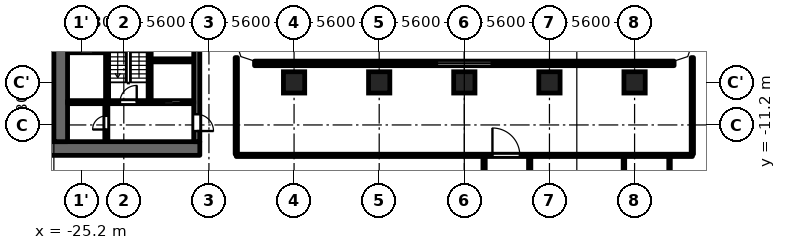
"""IFC4 building model, lengths in metres.
Left out: names, types, materials, properties, quantities, classifications, styles, units other than length and angle.
Written with IfcOpenShell. Run it as: python <this file> out.ifc"""

import sys

from ifc_helpers import new_model, si_unit, direction, frame, frame_2d, origin, origin_2d, place, context, subcontext, project, spatial, polyline, rectangle, outline, extrude, element, fill, save


model = new_model("IFC4")
c1 = context("Model", 3, precision=1e-05, world=origin(), true_north=direction((0.0, 1.0)))
c2 = subcontext(c1, "Body", "Model", "MODEL_VIEW")
j1 = project(units=[si_unit("LENGTHUNIT", "METRE"), si_unit("PLANEANGLEUNIT", "RADIAN")], contexts=[c1])
p1 = place(None, origin())
s1 = spatial("IfcSite", under=j1, at=p1, CompositionType="ELEMENT")
p2 = place(p1, origin())
s2 = spatial("IfcBuilding", under=s1, at=p2, CompositionType="ELEMENT")
p3 = place(p2, frame((0.0, 0.0, 11.3)))
s3 = spatial("IfcBuildingStorey", under=s2, at=p3, CompositionType="ELEMENT", Elevation=11.3)
for number, where, z_axis, x_axis in (
    (1, (-11.2, -8.4, 0.0), (0.0, 0.0, 1.0), (1.0, 0.0, 0.0)),
    (2, (-5.6, -8.4, 0.0), (0.0, 0.0, 1.0), (1.0, 0.0, 0.0)),
    (3, (0.0, -8.4, 0.0), (0.0, 0.0, 1.0), (1.0, 0.0, 0.0)),
    (4, (5.6, -8.4, 0.0), (0.0, 0.0, 1.0), (1.0, 0.0, 0.0)),
    (5, (11.2, -8.4, 0.0), (0.0, 0.0, 1.0), (1.0, 0.0, 0.0)),
):
    element("IfcColumn", number, at=place(p3, frame(where, z_axis=z_axis, x_axis=x_axis)), inside=s3, PredefinedType="COLUMN", context=c2, shape_type="SweptSolid", body=[
        extrude(rectangle(XDim=1.4, YDim=1.4, at=origin_2d()), origin(), (0.0, 0.0, 1.0), 4.8),
    ])
p4 = place(p3, frame((13.8, -7.15, 0.0), z_axis=(0.0, 0.0, 1.0), x_axis=(-1.0, 0.0, 0.0)))
e6 = element("IfcWall", 6, at=p4, inside=s3, PredefinedType="SOLIDWALL", context=c2, shape_type="SweptSolid", body=[
    extrude(rectangle(XDim=27.6, YDim=0.3, at=frame_2d((13.8, 0.0))), origin(), (0.0, 0.0, 1.0), 4.45),
])
p5 = place(p4, frame((12.0, 0.0, 1.2)))
e7 = element("IfcOpeningElement", 7, at=p5, cuts=e6, PredefinedType="OPENING", context=c2, shape_type="SweptSolid", body=[
    extrude(rectangle(XDim=3.6, YDim=0.95, at=frame_2d((1.8, 0.475))), frame((0.0, 0.16, 0.0), z_axis=(0.0, -1.0, 0.0), x_axis=(1.0, 0.0, 0.0)), (0.0, 0.0, 1.0), 0.32),
])
p6 = place(p3, frame((-20.7, -9.6, 0.0), z_axis=(0.0, 0.0, 1.0), x_axis=(0.0, 1.0, 0.0)))
e8 = element("IfcWall", 8, at=p6, inside=s3, PredefinedType="SHEAR", context=c2, shape_type="SweptSolid", body=[
    extrude(rectangle(XDim=9.75, YDim=0.2, at=frame_2d((4.875, 0.0))), origin(), (0.0, 0.0, 1.0), 4.45),
])
p7 = place(p3, frame((-17.4, -12.75, 0.0), z_axis=(0.0, 0.0, 1.0), x_axis=(-1.0, 0.0, 0.0)))
e9 = element("IfcWall", 9, at=p7, inside=s3, PredefinedType="SHEAR", context=c2, shape_type="SweptSolid", body=[
    extrude(rectangle(XDim=10.4, YDim=0.9, at=frame_2d((5.2, 0.0))), origin(), (0.0, 0.0, 1.0), 4.45),
])
p8 = place(p3, frame((-17.6, -12.3, 0.0), z_axis=(0.0, 0.0, 1.0), x_axis=(0.0, 1.0, 0.0)))
e10 = element("IfcWall", 10, at=p8, inside=s3, PredefinedType="SHEAR", context=c2, shape_type="SweptSolid", body=[
    extrude(rectangle(XDim=24.6, YDim=0.4, at=frame_2d((12.3, 0.0))), origin(), (0.0, 0.0, 1.0), 4.45),
])
p9 = place(p8, frame((6.0, 0.0, 0.0)))
e11 = element("IfcOpeningElement", 11, at=p9, cuts=e10, PredefinedType="OPENING", context=c2, shape_type="SweptSolid", body=[
    extrude(rectangle(XDim=1.1, YDim=2.1, at=frame_2d((0.55, 1.05))), frame((0.0, 0.21, 0.0), z_axis=(0.0, -1.0, 0.0), x_axis=(1.0, 0.0, 0.0)), (0.0, 0.0, 1.0), 0.42),
])
p10 = place(p8, frame((8.4, 0.0, 0.0)))
e12 = element("IfcOpeningElement", 12, at=p10, cuts=e10, PredefinedType="OPENING", context=c2, shape_type="SweptSolid", body=[
    extrude(rectangle(XDim=1.1, YDim=2.1, at=frame_2d((0.55, 1.05))), frame((0.0, 0.21, 0.0), z_axis=(0.0, -1.0, 0.0), x_axis=(1.0, 0.0, 0.0)), (0.0, 0.0, 1.0), 0.42),
])
p11 = place(p8, frame((10.8, 0.0, 0.0)))
e13 = element("IfcOpeningElement", 13, at=p11, cuts=e10, PredefinedType="OPENING", context=c2, shape_type="SweptSolid", body=[
    extrude(rectangle(XDim=1.1, YDim=2.1, at=frame_2d((0.55, 1.05))), frame((0.0, 0.21, 0.0), z_axis=(0.0, -1.0, 0.0), x_axis=(1.0, 0.0, 0.0)), (0.0, 0.0, 1.0), 0.42),
])
p12 = place(p8, frame((16.75, 0.0, 0.0)))
e14 = element("IfcOpeningElement", 14, at=p12, cuts=e10, PredefinedType="OPENING", context=c2, shape_type="SweptSolid", body=[
    extrude(rectangle(XDim=0.9, YDim=2.1, at=frame_2d((0.45, 1.05))), frame((0.0, 0.21, 0.0), z_axis=(0.0, -1.0, 0.0), x_axis=(1.0, 0.0, 0.0)), (0.0, 0.0, 1.0), 0.42),
])
p13 = place(p8, frame((22.8, 0.0, 0.0)))
e15 = element("IfcOpeningElement", 15, at=p13, cuts=e10, PredefinedType="OPENING", context=c2, shape_type="SweptSolid", body=[
    extrude(rectangle(XDim=1.1, YDim=2.1, at=frame_2d((0.55, 1.05))), frame((0.0, 0.21, 0.0), z_axis=(0.0, -1.0, 0.0), x_axis=(1.0, 0.0, 0.0)), (0.0, 0.0, 1.0), 0.42),
])
p14 = place(p8, frame((0.7, 0.0, 0.0)))
e16 = element("IfcOpeningElement", 16, at=p14, cuts=e10, PredefinedType="OPENING", context=c2, shape_type="SweptSolid", body=[
    extrude(rectangle(XDim=1.1, YDim=2.1, at=frame_2d((0.55, 1.05))), frame((0.0, 0.21, 0.0), z_axis=(0.0, -1.0, 0.0), x_axis=(1.0, 0.0, 0.0)), (0.0, 0.0, 1.0), 0.42),
])
p15 = place(p8, frame((12.775, 0.0, 0.0)))
e17 = element("IfcOpeningElement", 17, at=p15, cuts=e10, PredefinedType="OPENING", context=c2, shape_type="SweptSolid", body=[
    extrude(rectangle(XDim=1.8, YDim=2.1, at=frame_2d((0.9, 1.05))), frame((0.0, 0.21, 0.0), z_axis=(0.0, -1.0, 0.0), x_axis=(1.0, 0.0, 0.0)), (0.0, 0.0, 1.0), 0.42),
])
p16 = place(p3, frame((-26.55, -12.3, 0.0), z_axis=(0.0, 0.0, 1.0), x_axis=(0.0, 1.0, 0.0)))
e18 = element("IfcWall", 18, at=p16, inside=s3, PredefinedType="SHEAR", context=c2, shape_type="SweptSolid", body=[
    extrude(rectangle(XDim=24.6, YDim=0.9, at=frame_2d((12.3, 0.0))), origin(), (0.0, 0.0, 1.0), 4.45),
])
p17 = place(p3, frame((-23.55, -12.3, 0.0), z_axis=(0.0, 0.0, 1.0), x_axis=(0.0, 1.0, 0.0)))
e19 = element("IfcWall", 19, at=p17, inside=s3, PredefinedType="PARTITIONING", context=c2, shape_type="SweptSolid", body=[
    extrude(rectangle(XDim=2.5, YDim=0.2, at=frame_2d((1.25, 0.0))), origin(), (0.0, 0.0, 1.0), 4.45),
])
p18 = place(p17, frame((0.8, 0.0, 0.0)))
e20 = element("IfcOpeningElement", 20, at=p18, cuts=e19, PredefinedType="OPENING", context=c2, shape_type="SweptSolid", body=[
    extrude(rectangle(XDim=0.9, YDim=2.1, at=frame_2d((0.45, 1.05))), frame((0.0, 0.11, 0.0), z_axis=(0.0, -1.0, 0.0), x_axis=(1.0, 0.0, 0.0)), (0.0, 0.0, 1.0), 0.22),
])
p19 = place(p3, frame((-23.6, -6.35, 0.0), z_axis=(0.0, 0.0, 1.0), x_axis=(-1.0, 0.0, 0.0)))
e21 = element("IfcWall", 21, at=p19, inside=s3, PredefinedType="PARTITIONING", context=c2, shape_type="SweptSolid", body=[
    extrude(rectangle(XDim=2.5, YDim=0.2, at=frame_2d((1.25, 0.0))), origin(), (0.0, 0.0, 1.0), 4.45),
])
p20 = place(p19, frame((0.8, 0.0, 0.0)))
e22 = element("IfcOpeningElement", 22, at=p20, cuts=e21, PredefinedType="OPENING", context=c2, shape_type="SweptSolid", body=[
    extrude(rectangle(XDim=0.9, YDim=2.1, at=frame_2d((0.45, 1.05))), frame((0.0, 0.11, 0.0), z_axis=(0.0, -1.0, 0.0), x_axis=(1.0, 0.0, 0.0)), (0.0, 0.0, 1.0), 0.22),
])
p21 = place(p3, frame((-17.8, -9.7, 0.0), z_axis=(0.0, 0.0, 1.0), x_axis=(-1.0, 0.0, 0.0)))
e23 = element("IfcWall", 23, at=p21, inside=s3, PredefinedType="SHEAR", context=c2, shape_type="SweptSolid", body=[
    extrude(rectangle(XDim=8.3, YDim=0.2, at=frame_2d((4.15, 0.0))), origin(), (0.0, 0.0, 1.0), 4.45),
])
p22 = place(p21, frame((0.85, 0.0, 0.0)))
e24 = element("IfcOpeningElement", 24, at=p22, cuts=e23, PredefinedType="OPENING", context=c2, shape_type="SweptSolid", body=[
    extrude(rectangle(XDim=1.1, YDim=2.1, at=frame_2d((0.55, 1.05))), frame((0.0, 0.11, 0.0), z_axis=(0.0, -1.0, 0.0), x_axis=(1.0, 0.0, 0.0)), (0.0, 0.0, 1.0), 0.22),
])
p23 = place(p21, frame((3.75, 0.0, 0.0)))
e25 = element("IfcOpeningElement", 25, at=p23, cuts=e23, PredefinedType="OPENING", context=c2, shape_type="SweptSolid", body=[
    extrude(rectangle(XDim=1.1, YDim=2.1, at=frame_2d((0.55, 1.05))), frame((0.0, 0.11, 0.0), z_axis=(0.0, -1.0, 0.0), x_axis=(1.0, 0.0, 0.0)), (0.0, 0.0, 1.0), 0.22),
])
p24 = place(p3, frame((-17.8, -6.95, 0.0), z_axis=(0.0, 0.0, 1.0), x_axis=(-1.0, 0.0, 0.0)))
e26 = element("IfcWall", 26, at=p24, inside=s3, PredefinedType="PARTITIONING", context=c2, shape_type="SweptSolid", body=[
    extrude(rectangle(XDim=2.8, YDim=0.2, at=frame_2d((1.4, 0.0))), origin(), (0.0, 0.0, 1.0), 4.45),
])
p25 = place(p3, frame((-23.5, -9.6, 0.0), z_axis=(0.0, 0.0, 1.0), x_axis=(0.0, 1.0, 0.0)))
e27 = element("IfcWall", 27, at=p25, inside=s3, PredefinedType="SHEAR", context=c2, shape_type="SweptSolid", body=[
    extrude(rectangle(XDim=6.9, YDim=0.2, at=frame_2d((3.45, 0.0))), origin(), (0.0, 0.0, 1.0), 4.45),
])
p26 = place(p3, frame((-15.005, -13.2, 0.0), z_axis=(0.0, 0.0, 1.0), x_axis=(1.0, 0.0, 0.0)))
e28 = element("IfcWall", 28, at=p26, inside=s3, PredefinedType="PARTITIONING", context=c2, shape_type="SweptSolid", body=[
    extrude(rectangle(XDim=30.01, YDim=0.15, at=frame_2d((15.005, 0.0))), origin(), (0.0, 0.0, 1.0), 4.45),
])
p27 = place(p26, frame((16.855, 0.0, 0.0)))
e29 = element("IfcOpeningElement", 29, at=p27, cuts=e28, PredefinedType="OPENING", context=c2, shape_type="SweptSolid", body=[
    extrude(rectangle(XDim=1.8, YDim=2.1, at=frame_2d((0.9, 1.05))), frame((0.0, 0.085, 0.0), z_axis=(0.0, -1.0, 0.0), x_axis=(1.0, 0.0, 0.0)), (0.0, 0.0, 1.0), 0.17),
])
p28 = place(p3, frame((-15.0, -13.125, 0.0), z_axis=(0.0, 0.0, 1.0), x_axis=(0.0, 1.0, 0.0)))
e30 = element("IfcWall", 30, at=p28, inside=s3, PredefinedType="PARTITIONING", context=c2, shape_type="SweptSolid", body=[
    extrude(rectangle(XDim=6.356, YDim=0.15, at=frame_2d((3.178, 0.0))), origin(), (0.0, 0.0, 1.0), 4.45),
])
for number, where, z_axis, x_axis in (
    (31, (1.3, -22.325, 0.0), (0.0, 0.0, 1.0), (0.0, 1.0, 0.0)),
    (32, (4.3, -22.325, 0.0), (0.0, 0.0, 1.0), (0.0, 1.0, 0.0)),
):
    element("IfcWall", number, at=place(p3, frame(where, z_axis=z_axis, x_axis=x_axis)), inside=s3, PredefinedType="PARTITIONING", context=c2, shape_type="SweptSolid", body=[
        extrude(rectangle(XDim=9.05, YDim=0.15, at=frame_2d((4.525, 0.0))), origin(), (0.0, 0.0, 1.0), 4.45),
    ])
for number, where, z_axis, x_axis in (
    (33, (10.5, -22.325, 0.0), (0.0, 0.0, 1.0), (0.0, 1.0, 0.0)),
    (34, (13.5, -22.325, 0.0), (0.0, 0.0, 1.0), (0.0, 1.0, 0.0)),
):
    element("IfcWall", number, at=place(p3, frame(where, z_axis=z_axis, x_axis=x_axis)), inside=s3, PredefinedType="PARTITIONING", context=c2, shape_type="SweptSolid", body=[
        extrude(rectangle(XDim=9.05, YDim=0.1, at=frame_2d((4.525, 0.0))), origin(), (0.0, 0.0, 1.0), 4.45),
    ])
p29 = place(p3, frame((15.0, -13.125, 0.0), z_axis=(0.0, 0.0, 1.0), x_axis=(0.0, 1.0, 0.0)))
e35 = element("IfcWall", 35, at=p29, inside=s3, PredefinedType="PARTITIONING", context=c2, shape_type="SweptSolid", body=[
    extrude(rectangle(XDim=6.356, YDim=0.15, at=frame_2d((3.178, 0.0))), origin(), (0.0, 0.0, 1.0), 4.45),
])
p30 = place(p3, origin())
e36 = element("IfcWall", 36, at=p30, inside=s3, PredefinedType="SOLIDWALL", context=c2, shape_type="SweptSolid", body=[
    extrude(outline(polyline([(14.937, -6.937), (15.3, -5.849), (15.3, -5.8), (15.0, -5.8), (14.7, -6.7), (13.8, -7.0), (13.8, -7.3), (13.849, -7.3), (14.937, -6.937)])), origin(), (0.0, 0.0, 1.0), 4.45),
])
e37 = element("IfcWall", 37, at=p30, inside=s3, PredefinedType="SOLIDWALL", context=c2, shape_type="SweptSolid", body=[
    extrude(outline(polyline([(-14.937, -6.937), (-13.849, -7.3), (-13.8, -7.3), (-13.8, -7.0), (-14.7, -6.7), (-15.0, -5.8), (-15.3, -5.8), (-15.3, -5.849), (-14.937, -6.937)])), origin(), (0.0, 0.0, 1.0), 4.45),
])
p31 = place(p22, origin())
e38 = element("IfcDoor", 38, at=p31, inside=s3, OperationType="DOUBLE_DOOR_SLIDING", PredefinedType="DOOR", context=c2, shape_type="SweptSolid", body=[
    extrude(rectangle(XDim=1.1, YDim=2.1, at=frame_2d((0.55, 1.05))), frame((0.0, 0.025, 0.0), z_axis=(0.0, -1.0, 0.0), x_axis=(1.0, 0.0, 0.0)), (0.0, 0.0, 1.0), 0.05),
])
fill(e24, e38)
p32 = place(p14, origin())
e39 = element("IfcDoor", 39, at=p32, inside=s3, OperationType="SINGLE_SWING_LEFT", PredefinedType="DOOR", context=c2, shape_type="SweptSolid", body=[
    extrude(rectangle(XDim=1.1, YDim=2.1, at=frame_2d((0.55, 1.05))), frame((0.0, 0.025, 0.0), z_axis=(0.0, -1.0, 0.0), x_axis=(1.0, 0.0, 0.0)), (0.0, 0.0, 1.0), 0.05),
])
fill(e16, e39)
p33 = place(p18, origin())
e40 = element("IfcDoor", 40, at=p33, inside=s3, OperationType="SINGLE_SWING_RIGHT", PredefinedType="DOOR", context=c2, shape_type="SweptSolid", body=[
    extrude(rectangle(XDim=0.9, YDim=2.1, at=frame_2d((0.45, 1.05))), frame((0.0, 0.025, 0.0), z_axis=(0.0, -1.0, 0.0), x_axis=(1.0, 0.0, 0.0)), (0.0, 0.0, 1.0), 0.05),
])
fill(e20, e40)
p34 = place(p23, origin())
e41 = element("IfcDoor", 41, at=p34, inside=s3, OperationType="SINGLE_SWING_LEFT", PredefinedType="DOOR", context=c2, shape_type="SweptSolid", body=[
    extrude(rectangle(XDim=1.1, YDim=2.1, at=frame_2d((0.55, 1.05))), frame((0.0, 0.025, 0.0), z_axis=(0.0, -1.0, 0.0), x_axis=(1.0, 0.0, 0.0)), (0.0, 0.0, 1.0), 0.05),
])
fill(e25, e41)
p35 = place(p27, origin())
e42 = element("IfcDoor", 42, at=p35, inside=s3, OperationType="SINGLE_SWING_RIGHT", PredefinedType="DOOR", context=c2, shape_type="SweptSolid", body=[
    extrude(rectangle(XDim=1.8, YDim=2.1, at=frame_2d((0.9, 1.05))), frame((0.0, 0.025, 0.0), z_axis=(0.0, -1.0, 0.0), x_axis=(1.0, 0.0, 0.0)), (0.0, 0.0, 1.0), 0.05),
])
fill(e29, e42)
p36 = place(p5, origin())
e43 = element("IfcWindow", 43, at=p36, inside=s3, PartitioningType="SINGLE_PANEL", PredefinedType="WINDOW", context=c2, shape_type="SweptSolid", body=[
    extrude(rectangle(XDim=3.6, YDim=0.95, at=frame_2d((1.8, 0.475))), frame((0.0, 0.03, 0.0), z_axis=(0.0, -1.0, 0.0), x_axis=(1.0, 0.0, 0.0)), (0.0, 0.0, 1.0), 0.06),
])
fill(e7, e43)
save(model, sys.argv[1])
